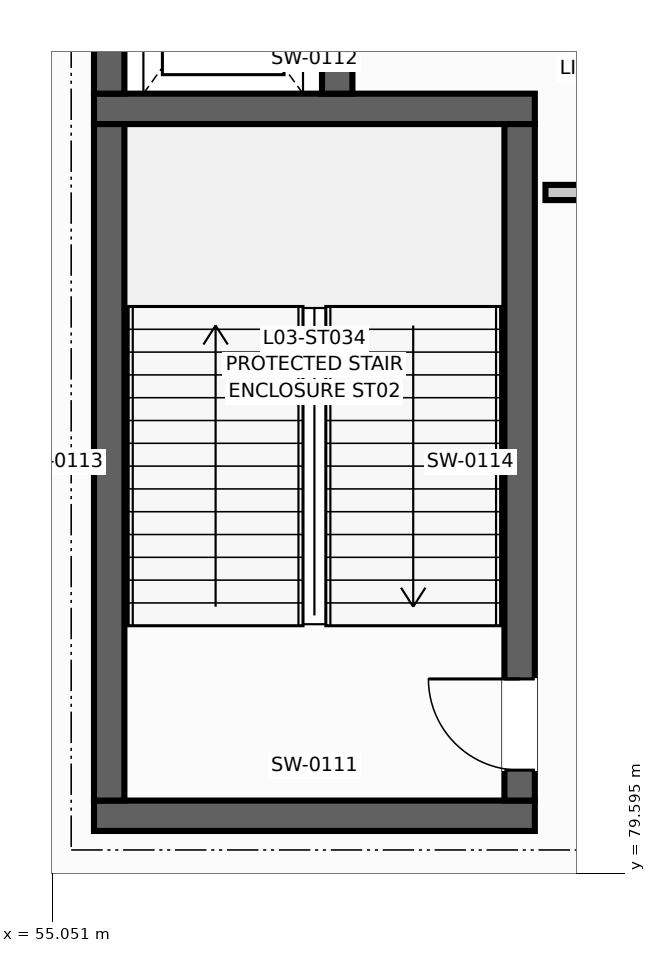
"""IFC4 building model, lengths in metres.
Left out: names, types, materials, properties, quantities, classifications, styles, units other than length and angle.
Written with IfcOpenShell. Run it as: python <this file> out.ifc"""

import sys

from ifc_helpers import new_model, si_unit, direction, frame, frame_2d, origin, place, context, subcontext, project, spatial, rectangle, extrude, element, fill, save


model = new_model("IFC4")
c1 = context("Model", 3, precision=1e-05, world=origin(), true_north=direction((0.0, 1.0)))
c2 = subcontext(c1, "Body", "Model", "MODEL_VIEW")
j1 = project(units=[si_unit("LENGTHUNIT", "METRE"), si_unit("PLANEANGLEUNIT", "RADIAN")], contexts=[c1])
p1 = place(None, origin())
s1 = spatial("IfcSite", under=j1, at=p1, CompositionType="ELEMENT")
p2 = place(p1, origin())
s2 = spatial("IfcBuilding", under=s1, at=p2, CompositionType="ELEMENT")
p3 = place(p2, frame((0.0, 0.0, 13.5)))
s3 = spatial("IfcBuildingStorey", under=s2, at=p3, CompositionType="ELEMENT", Elevation=13.5)
for number, where, z_axis, x_axis in (
    (1, (55.6, 80.35, 0.0), (0.0, 0.0, 1.0), (1.0, 0.0, 0.0)),
    (2, (55.6, 89.65, 0.0), (0.0, 0.0, 1.0), (1.0, 0.0, 0.0)),
):
    element("IfcWall", number, at=place(p3, frame(where, z_axis=z_axis, x_axis=x_axis)), inside=s3, PredefinedType="SHEAR", context=c2, shape_type="SweptSolid", body=[
        extrude(rectangle(XDim=5.8, YDim=0.4, at=frame_2d((2.9, 0.0))), origin(), (0.0, 0.0, 1.0), 4.25),
    ])
p4 = place(p3, frame((55.8, 80.55, 0.0), z_axis=(0.0, 0.0, 1.0), x_axis=(0.0, 1.0, 0.0)))
e3 = element("IfcWall", 3, at=p4, inside=s3, PredefinedType="SHEAR", context=c2, shape_type="SweptSolid", body=[
    extrude(rectangle(XDim=8.9, YDim=0.4, at=frame_2d((4.45, 0.0))), origin(), (0.0, 0.0, 1.0), 4.25),
])
p5 = place(p3, frame((61.2, 80.55, 0.0), z_axis=(0.0, 0.0, 1.0), x_axis=(0.0, 1.0, 0.0)))
e4 = element("IfcWall", 4, at=p5, inside=s3, PredefinedType="SHEAR", context=c2, shape_type="SweptSolid", body=[
    extrude(rectangle(XDim=8.9, YDim=0.4, at=frame_2d((4.45, 0.0))), origin(), (0.0, 0.0, 1.0), 4.25),
])
p6 = place(p5, frame((0.4, 0.0, 0.0)))
e5 = element("IfcOpeningElement", 5, at=p6, cuts=e4, PredefinedType="OPENING", context=c2, shape_type="SweptSolid", body=[
    extrude(rectangle(XDim=1.2, YDim=2.2, at=frame_2d((0.6, 1.1))), frame((0.0, 0.21, 0.0), z_axis=(0.0, -1.0, 0.0), x_axis=(1.0, 0.0, 0.0)), (0.0, 0.0, 1.0), 0.42),
])
p7 = place(p3, frame((55.8, 89.85, 0.0), z_axis=(0.0, 0.0, 1.0), x_axis=(0.0, 1.0, 0.0)))
e6 = element("IfcWall", 6, at=p7, inside=s3, PredefinedType="SHEAR", context=c2, shape_type="SweptSolid", body=[
    extrude(rectangle(XDim=2.9, YDim=0.4, at=frame_2d((1.45, 0.0))), origin(), (0.0, 0.0, 1.0), 4.25),
])
p8 = place(p3, frame((58.8, 89.85, 0.0), z_axis=(0.0, 0.0, 1.0), x_axis=(0.0, 1.0, 0.0)))
e7 = element("IfcWall", 7, at=p8, inside=s3, PredefinedType="SHEAR", context=c2, shape_type="SweptSolid", body=[
    extrude(rectangle(XDim=2.9, YDim=0.4, at=frame_2d((1.45, 0.0))), origin(), (0.0, 0.0, 1.0), 4.25),
])
p9 = place(p8, frame((0.9, 0.0, 0.0)))
e8 = element("IfcOpeningElement", 8, at=p9, cuts=e7, PredefinedType="OPENING", context=c2, shape_type="SweptSolid", body=[
    extrude(rectangle(XDim=1.1, YDim=2.2, at=frame_2d((0.55, 1.1))), frame((0.0, 0.21, 0.0), z_axis=(0.0, -1.0, 0.0), x_axis=(1.0, 0.0, 0.0)), (0.0, 0.0, 1.0), 0.42),
])
p10 = place(p3, frame((61.54, 88.55, 0.0), z_axis=(0.0, 0.0, 1.0), x_axis=(1.0, 0.0, 0.0)))
e9 = element("IfcWall", 9, at=p10, inside=s3, PredefinedType="PARTITIONING", context=c2, shape_type="SweptSolid", body=[
    extrude(rectangle(XDim=4.18, YDim=0.2, at=frame_2d((2.09, 0.0))), origin(), (0.0, 0.0, 1.0), 3.22),
])
p11 = place(p6, origin())
e10 = element("IfcDoor", 10, at=p11, inside=s3, OperationType="SINGLE_SWING_RIGHT", PredefinedType="DOOR", context=c2, shape_type="SweptSolid", body=[
    extrude(rectangle(XDim=1.2, YDim=2.2, at=frame_2d((0.6, 1.1))), frame((0.0, 0.025, 0.0), z_axis=(0.0, -1.0, 0.0), x_axis=(1.0, 0.0, 0.0)), (0.0, 0.0, 1.0), 0.05),
])
fill(e5, e10)
save(model, sys.argv[1])
